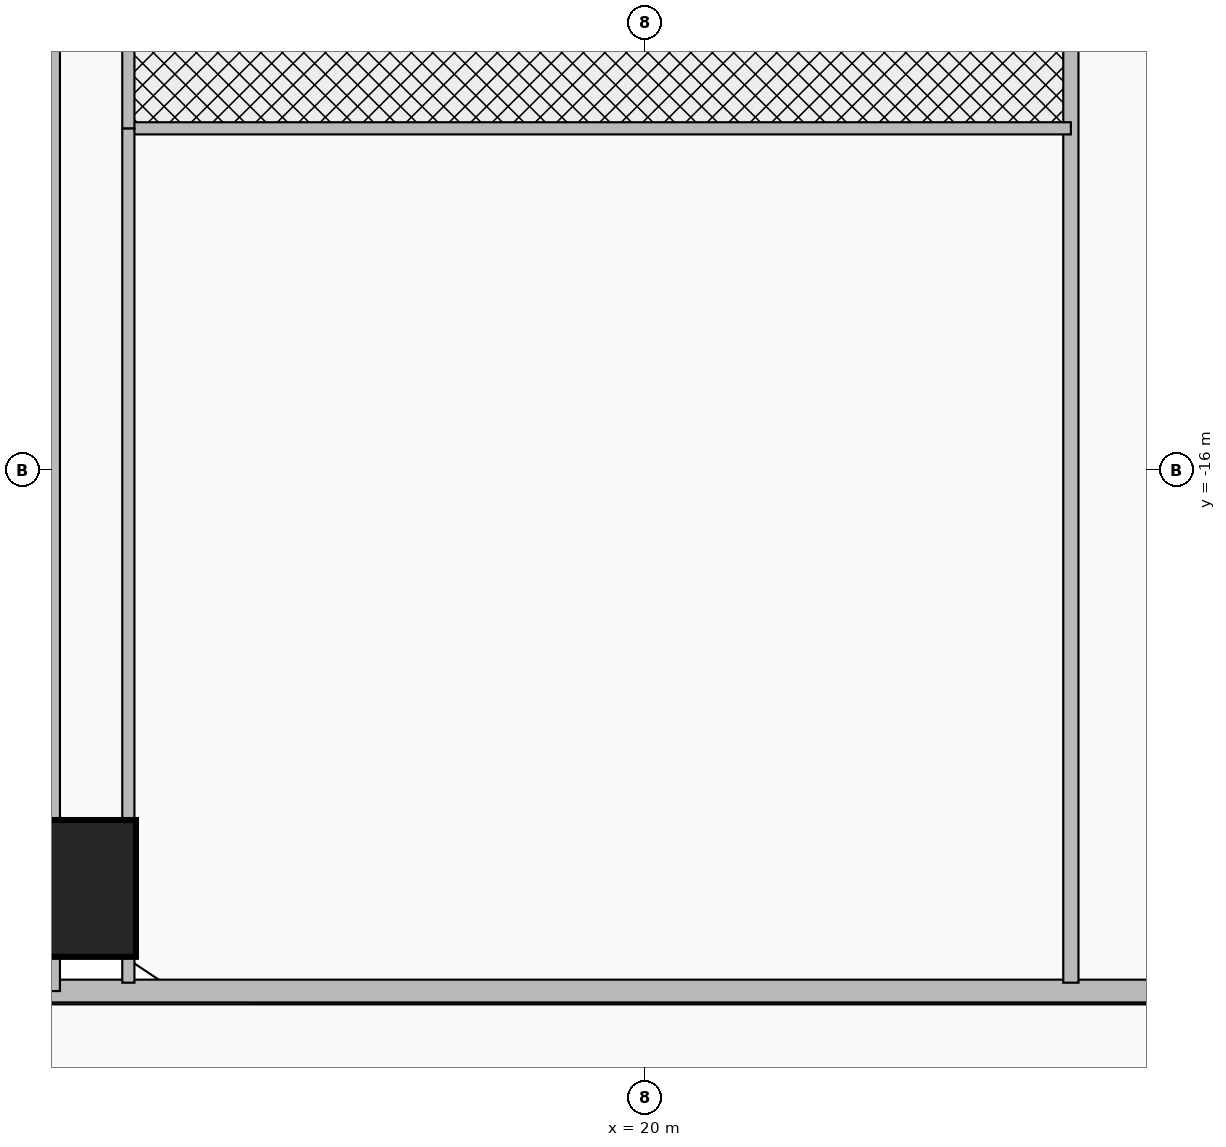
"""IFC4 building model, lengths in metres.
Left out: names, types, materials, properties, quantities, classifications, styles, units other than length and angle.
Written with IfcOpenShell. Run it as: python <this file> out.ifc"""

import sys

from ifc_helpers import new_model, si_unit, direction, frame, frame_2d, origin, origin_2d, place, context, subcontext, project, spatial, rectangle, extrude, source, transform, mapped, element, fill, save


model = new_model("IFC4")
c1 = context("Model", 3, precision=1e-05, world=origin(), true_north=direction((0.0, 1.0)))
c2 = subcontext(c1, "Body", "Model", "MODEL_VIEW")
j1 = project(units=[si_unit("LENGTHUNIT", "METRE"), si_unit("PLANEANGLEUNIT", "RADIAN")], contexts=[c1])
p1 = place(None, origin())
s1 = spatial("IfcSite", under=j1, at=p1, CompositionType="ELEMENT")
p2 = place(p1, origin())
s2 = spatial("IfcBuilding", under=s1, at=p2, CompositionType="ELEMENT")
p3 = place(p2, origin())
s3 = spatial("IfcBuildingStorey", under=s2, at=p3, CompositionType="ELEMENT", Elevation=0.0)
m1 = source(origin(), c2, "Body", "SweptSolid", [
    extrude(rectangle(XDim=1.8, YDim=1.8, at=origin_2d()), origin(), (0.0, 0.0, 1.0), 5.2),
])
p4 = place(p3, frame((12.4, -21.5, 0.0), z_axis=(0.0, 0.0, 1.0), x_axis=(1.0, 0.0, 0.0)))
e1 = element("IfcColumn", 1, at=p4, inside=s3, PredefinedType="COLUMN", context=c2, shape_type="MappedRepresentation", body=[
    mapped(m1, transform((0.0, 0.0, 0.0), x_axis=(1.0, 0.0, 0.0), y_axis=(0.0, 1.0, 0.0), z_axis=(0.0, 0.0, 1.0), scale=1.0)),
])
p5 = place(p3, frame((12.15, -22.85, 0.0), z_axis=(0.0, 0.0, 1.0), x_axis=(1.0, 0.0, 0.0)))
e2 = element("IfcWall", 2, at=p5, inside=s3, PredefinedType="SOLIDWALL", context=c2, shape_type="SweptSolid", body=[
    extrude(rectangle(XDim=21.7, YDim=0.3, at=frame_2d((10.85, 0.0))), origin(), (0.0, 0.0, 1.0), 4.92),
])
p6 = place(p5, frame((15.55, 0.0, 0.0)))
e3 = element("IfcOpeningElement", 3, at=p6, cuts=e2, PredefinedType="OPENING", context=c2, shape_type="SweptSolid", body=[
    extrude(rectangle(XDim=1.8, YDim=2.2, at=frame_2d((0.9, 1.1))), frame((0.0, 0.165, 0.0), z_axis=(0.0, -1.0, 0.0), x_axis=(1.0, 0.0, 0.0)), (0.0, 0.0, 1.0), 0.33),
])
p7 = place(p3, frame((12.15, -22.85, 0.0), z_axis=(0.0, 0.0, 1.0), x_axis=(0.0, 1.0, 0.0)))
e4 = element("IfcWall", 4, at=p7, inside=s3, PredefinedType="SOLIDWALL", context=c2, shape_type="SweptSolid", body=[
    extrude(rectangle(XDim=17.0, YDim=0.3, at=frame_2d((8.5, 0.0))), origin(), (0.0, 0.0, 1.0), 3.957),
])
p8 = place(p3, frame((25.6, -22.74, 0.0), z_axis=(0.0, 0.0, 1.0), x_axis=(0.0, 1.0, 0.0)))
e5 = element("IfcWall", 5, at=p8, inside=s3, PredefinedType="PARTITIONING", context=c2, shape_type="SweptSolid", body=[
    extrude(rectangle(XDim=13.19, YDim=0.2, at=frame_2d((6.595, 0.0))), origin(), (0.0, 0.0, 1.0), 3.957),
])
p9 = place(p3, frame((13.2, -11.5, 0.0), z_axis=(0.0, 0.0, 1.0), x_axis=(1.0, 0.0, 0.0)))
e6 = element("IfcWall", 6, at=p9, inside=s3, PredefinedType="PARTITIONING", context=c2, shape_type="SweptSolid", body=[
    extrude(rectangle(XDim=12.4, YDim=0.16, at=frame_2d((6.2, 0.0))), origin(), (0.0, 0.0, 1.0), 4.92),
])
p10 = place(p9, frame((4.5, 0.0, 0.0)))
e7 = element("IfcOpeningElement", 7, at=p10, cuts=e6, PredefinedType="OPENING", context=c2, shape_type="SweptSolid", body=[
    extrude(rectangle(XDim=1.4, YDim=2.15, at=frame_2d((0.7, 1.075))), frame((0.0, 0.095, 0.0), z_axis=(0.0, -1.0, 0.0), x_axis=(1.0, 0.0, 0.0)), (0.0, 0.0, 1.0), 0.19),
])
p11 = place(p3, frame((13.2, -22.74, 0.0), z_axis=(0.0, 0.0, 1.0), x_axis=(0.0, 1.0, 0.0)))
e8 = element("IfcWall", 8, at=p11, inside=s3, PredefinedType="PARTITIONING", context=c2, shape_type="SweptSolid", body=[
    extrude(rectangle(XDim=11.24, YDim=0.16, at=frame_2d((5.62, 0.0))), origin(), (0.0, 0.0, 1.0), 4.92),
])
p12 = place(p3, frame((13.2, -11.5, 0.0), z_axis=(0.0, 0.0, 1.0), x_axis=(0.0, 1.0, 0.0)))
e9 = element("IfcWall", 9, at=p12, inside=s3, PredefinedType="PARTITIONING", context=c2, shape_type="SweptSolid", body=[
    extrude(rectangle(XDim=5.65, YDim=0.16, at=frame_2d((2.825, 0.0))), origin(), (0.0, 0.0, 1.0), 3.957),
])
p13 = place(p10, frame((1.4, 0.0, 0.0), z_axis=(0.0, 0.0, 1.0), x_axis=(-1.0, 0.0, 0.0)))
e10 = element("IfcDoor", 10, at=p13, inside=s3, OperationType="DOUBLE_DOOR_SINGLE_SWING", PredefinedType="DOOR", context=c2, shape_type="SweptSolid", body=[
    extrude(rectangle(XDim=1.4, YDim=2.15, at=frame_2d((0.7, 1.075))), frame((0.0, 0.025, 0.0), z_axis=(0.0, -1.0, 0.0), x_axis=(1.0, 0.0, 0.0)), (0.0, 0.0, 1.0), 0.05),
])
fill(e7, e10)
save(model, sys.argv[1])
